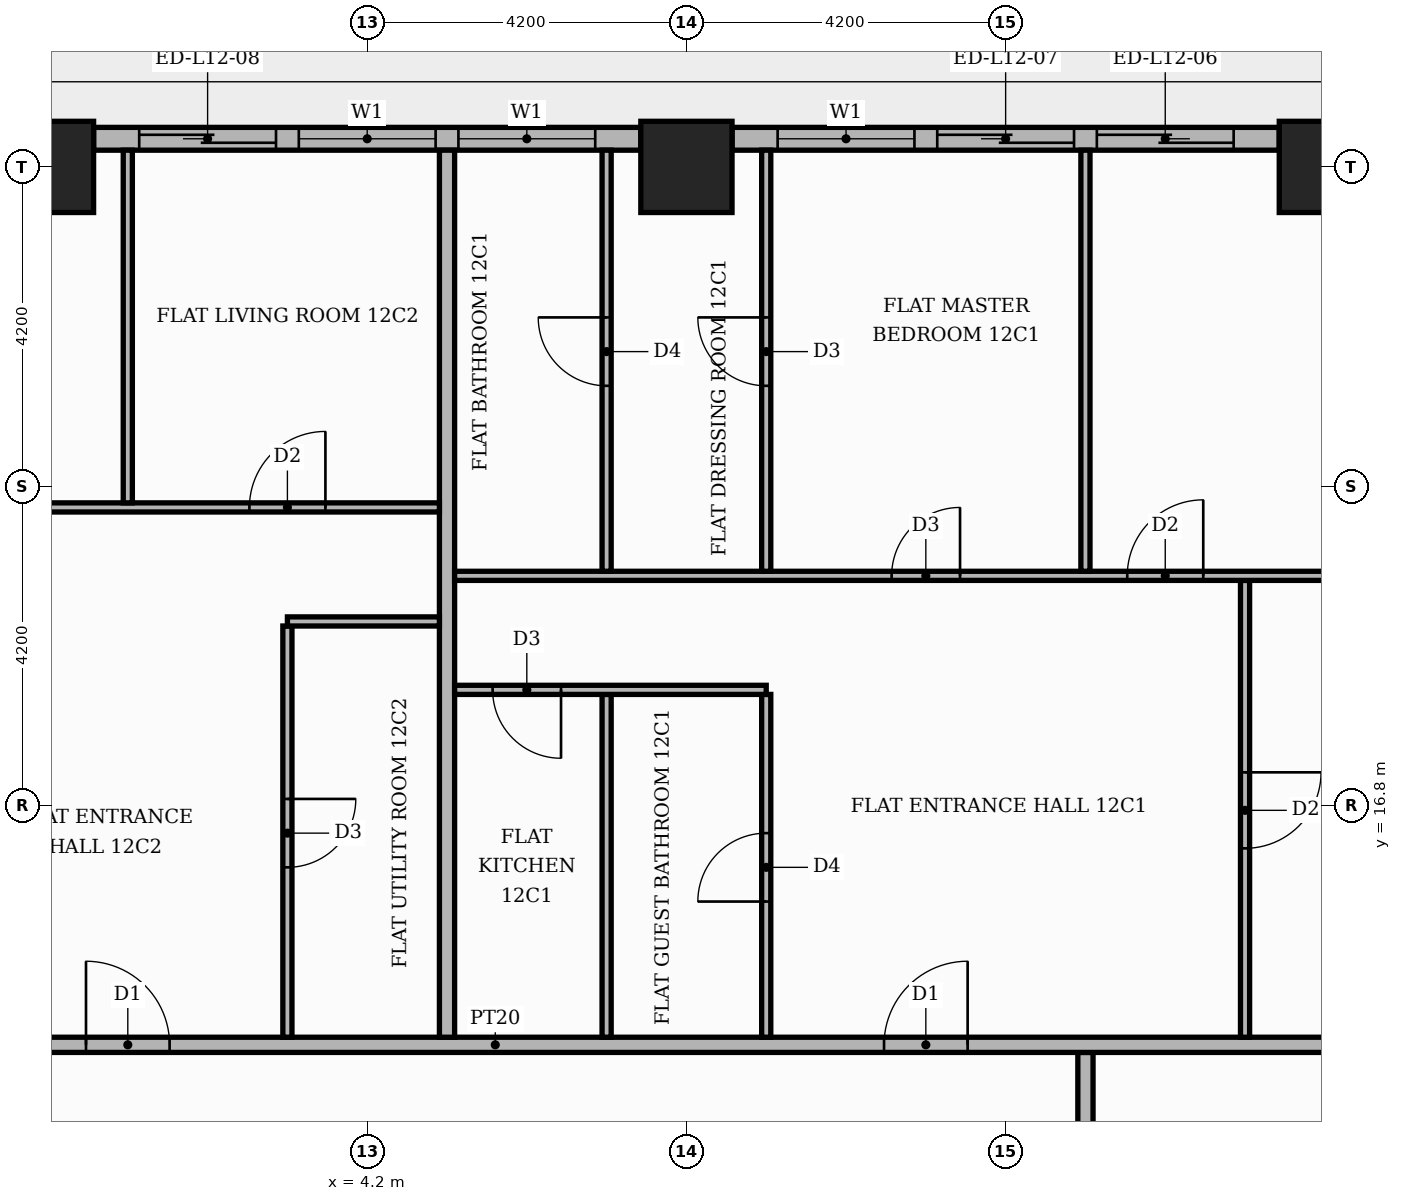
"""IFC4 building model, lengths in metres.
Left out: names, types, materials, properties, quantities, classifications, styles, units other than length and angle.
Written with IfcOpenShell. Run it as: python <this file> out.ifc"""

import sys

from ifc_helpers import new_model, si_unit, direction, frame, frame_2d, origin, origin_2d, place, context, subcontext, project, spatial, rectangle, extrude, element, fill, save


model = new_model("IFC4")
c1 = context("Model", 3, precision=1e-05, world=origin(), true_north=direction((0.0, 1.0)))
c2 = subcontext(c1, "Body", "Model", "MODEL_VIEW")
j1 = project(units=[si_unit("LENGTHUNIT", "METRE"), si_unit("PLANEANGLEUNIT", "RADIAN")], contexts=[c1])
p1 = place(None, origin())
s1 = spatial("IfcSite", under=j1, at=p1, CompositionType="ELEMENT")
p2 = place(p1, origin())
s2 = spatial("IfcBuilding", under=s1, at=p2, CompositionType="ELEMENT")
p3 = place(p2, frame((0.0, 0.0, 54.3)))
s3 = spatial("IfcBuildingStorey", under=s2, at=p3, CompositionType="ELEMENT", Elevation=54.3)
for number, where, z_axis, x_axis in (
    (1, (0.0, 25.2, 0.0), (0.0, 0.0, 1.0), (1.0, 0.0, 0.0)),
    (2, (8.4, 25.2, 0.0), (0.0, 0.0, 1.0), (1.0, 0.0, 0.0)),
    (3, (16.8, 25.2, 0.0), (0.0, 0.0, 1.0), (1.0, 0.0, 0.0)),
):
    element("IfcColumn", number, at=place(p3, frame(where, z_axis=z_axis, x_axis=x_axis)), inside=s3, PredefinedType="COLUMN", context=c2, shape_type="SweptSolid", body=[
        extrude(rectangle(XDim=1.2, YDim=1.2, at=origin_2d()), origin(), (0.0, 0.0, 1.0), 3.9),
    ])
p4 = place(p3, frame((16.2, 25.57, 0.0), z_axis=(0.0, 0.0, 1.0), x_axis=(-1.0, 0.0, 0.0)))
e4 = element("IfcWall", 4, at=p4, inside=s3, PredefinedType="STANDARD", context=c2, shape_type="SweptSolid", body=[
    extrude(rectangle(XDim=7.2, YDim=0.3, at=frame_2d((3.6, 0.0))), origin(), (0.0, 0.0, 1.0), 3.48),
])
p5 = place(p4, frame((0.6, 0.0, 0.0)))
e5 = element("IfcOpeningElement", 5, at=p5, cuts=e4, PredefinedType="OPENING", context=c2, shape_type="SweptSolid", body=[
    extrude(rectangle(XDim=1.8, YDim=2.4, at=frame_2d((0.9, 1.2))), frame((0.0, 0.16, 0.0), z_axis=(0.0, -1.0, 0.0), x_axis=(1.0, 0.0, 0.0)), (0.0, 0.0, 1.0), 0.32),
])
p6 = place(p4, frame((2.7, 0.0, 0.0)))
e6 = element("IfcOpeningElement", 6, at=p6, cuts=e4, PredefinedType="OPENING", context=c2, shape_type="SweptSolid", body=[
    extrude(rectangle(XDim=1.8, YDim=2.4, at=frame_2d((0.9, 1.2))), frame((0.0, 0.16, 0.0), z_axis=(0.0, -1.0, 0.0), x_axis=(1.0, 0.0, 0.0)), (0.0, 0.0, 1.0), 0.32),
])
p7 = place(p4, frame((4.8, 0.0, 0.9)))
e7 = element("IfcOpeningElement", 7, at=p7, cuts=e4, PredefinedType="OPENING", context=c2, shape_type="SweptSolid", body=[
    extrude(rectangle(XDim=1.8, YDim=2.1, at=frame_2d((0.9, 1.05))), frame((0.0, 0.16, 0.0), z_axis=(0.0, -1.0, 0.0), x_axis=(1.0, 0.0, 0.0)), (0.0, 0.0, 1.0), 0.32),
])
p8 = place(p3, frame((7.8, 25.57, 0.0), z_axis=(0.0, 0.0, 1.0), x_axis=(-1.0, 0.0, 0.0)))
e8 = element("IfcWall", 8, at=p8, inside=s3, PredefinedType="STANDARD", context=c2, shape_type="SweptSolid", body=[
    extrude(rectangle(XDim=7.2, YDim=0.3, at=frame_2d((3.6, 0.0))), origin(), (0.0, 0.0, 1.0), 3.48),
])
p9 = place(p8, frame((0.6, 0.0, 0.9)))
e9 = element("IfcOpeningElement", 9, at=p9, cuts=e8, PredefinedType="OPENING", context=c2, shape_type="SweptSolid", body=[
    extrude(rectangle(XDim=1.8, YDim=2.1, at=frame_2d((0.9, 1.05))), frame((0.0, 0.16, 0.0), z_axis=(0.0, -1.0, 0.0), x_axis=(1.0, 0.0, 0.0)), (0.0, 0.0, 1.0), 0.32),
])
p10 = place(p8, frame((2.7, 0.0, 0.9)))
e10 = element("IfcOpeningElement", 10, at=p10, cuts=e8, PredefinedType="OPENING", context=c2, shape_type="SweptSolid", body=[
    extrude(rectangle(XDim=1.8, YDim=2.1, at=frame_2d((0.9, 1.05))), frame((0.0, 0.16, 0.0), z_axis=(0.0, -1.0, 0.0), x_axis=(1.0, 0.0, 0.0)), (0.0, 0.0, 1.0), 0.32),
])
p11 = place(p8, frame((4.8, 0.0, 0.0)))
e11 = element("IfcOpeningElement", 11, at=p11, cuts=e8, PredefinedType="OPENING", context=c2, shape_type="SweptSolid", body=[
    extrude(rectangle(XDim=1.8, YDim=2.4, at=frame_2d((0.9, 1.2))), frame((0.0, 0.16, 0.0), z_axis=(0.0, -1.0, 0.0), x_axis=(1.0, 0.0, 0.0)), (0.0, 0.0, 1.0), 0.32),
])
p12 = place(p3, frame((13.65, -13.55, 0.0), z_axis=(0.0, 0.0, 1.0), x_axis=(0.0, 1.0, 0.0)))
e12 = element("IfcWall", 12, at=p12, inside=s3, PredefinedType="PARTITIONING", context=c2, shape_type="SweptSolid", body=[
    extrude(rectangle(XDim=27.1, YDim=0.2, at=frame_2d((13.55, 0.0))), origin(), (0.0, 0.0, 1.0), 3.48),
])
p13 = place(p12, frame((1.45, 0.0, 0.0)))
e13 = element("IfcOpeningElement", 13, at=p13, cuts=e12, PredefinedType="OPENING", context=c2, shape_type="SweptSolid", body=[
    extrude(rectangle(XDim=1.1, YDim=2.4, at=frame_2d((0.55, 1.2))), frame((0.0, 0.11, 0.0), z_axis=(0.0, -1.0, 0.0), x_axis=(1.0, 0.0, 0.0)), (0.0, 0.0, 1.0), 0.22),
])
p14 = place(p3, frame((-13.65, 13.65, 0.0), z_axis=(0.0, 0.0, 1.0), x_axis=(1.0, 0.0, 0.0)))
e14 = element("IfcWall", 14, at=p14, inside=s3, PredefinedType="PARTITIONING", context=c2, shape_type="SweptSolid", body=[
    extrude(rectangle(XDim=39.07, YDim=0.2, at=frame_2d((19.535, 0.0))), origin(), (0.0, 0.0, 1.0), 3.48),
])
p15 = place(p14, frame((24.65, 0.0, 0.0)))
e15 = element("IfcOpeningElement", 15, at=p15, cuts=e14, PredefinedType="OPENING", context=c2, shape_type="SweptSolid", body=[
    extrude(rectangle(XDim=1.1, YDim=2.4, at=frame_2d((0.55, 1.2))), frame((0.0, 0.11, 0.0), z_axis=(0.0, -1.0, 0.0), x_axis=(1.0, 0.0, 0.0)), (0.0, 0.0, 1.0), 0.22),
])
p16 = place(p14, frame((14.15, 0.0, 0.0)))
e16 = element("IfcOpeningElement", 16, at=p16, cuts=e14, PredefinedType="OPENING", context=c2, shape_type="SweptSolid", body=[
    extrude(rectangle(XDim=1.1, YDim=2.4, at=frame_2d((0.55, 1.2))), frame((0.0, 0.11, 0.0), z_axis=(0.0, -1.0, 0.0), x_axis=(1.0, 0.0, 0.0)), (0.0, 0.0, 1.0), 0.22),
])
p17 = place(p3, frame((3.15, 13.75, 0.0), z_axis=(0.0, 0.0, 1.0), x_axis=(0.0, 1.0, 0.0)))
e17 = element("IfcWall", 17, at=p17, inside=s3, PredefinedType="PARTITIONING", context=c2, shape_type="SweptSolid", body=[
    extrude(rectangle(XDim=5.41, YDim=0.12, at=frame_2d((2.705, 0.0))), origin(), (0.0, 0.0, 1.0), 3.48),
])
p18 = place(p17, frame((2.235, 0.0, 0.0)))
e18 = element("IfcOpeningElement", 18, at=p18, cuts=e17, PredefinedType="OPENING", context=c2, shape_type="SweptSolid", body=[
    extrude(rectangle(XDim=0.9, YDim=2.1, at=frame_2d((0.45, 1.05))), frame((0.0, 0.07, 0.0), z_axis=(0.0, -1.0, 0.0), x_axis=(1.0, 0.0, 0.0)), (0.0, 0.0, 1.0), 0.14),
])
p19 = place(p3, frame((5.25, 13.75, 0.0), z_axis=(0.0, 0.0, 1.0), x_axis=(0.0, 1.0, 0.0)))
e19 = element("IfcWall", 19, at=p19, inside=s3, PredefinedType="PARTITIONING", context=c2, shape_type="SweptSolid", body=[
    extrude(rectangle(XDim=11.67, YDim=0.2, at=frame_2d((5.835, 0.0))), origin(), (0.0, 0.0, 1.0), 3.48),
])
p20 = place(p3, frame((7.35, 13.75, 0.0), z_axis=(0.0, 0.0, 1.0), x_axis=(0.0, 1.0, 0.0)))
e20 = element("IfcWall", 20, at=p20, inside=s3, PredefinedType="PARTITIONING", context=c2, shape_type="SweptSolid", body=[
    extrude(rectangle(XDim=4.51, YDim=0.12, at=frame_2d((2.255, 0.0))), origin(), (0.0, 0.0, 1.0), 3.48),
])
p21 = place(p3, frame((9.45, 13.75, 0.0), z_axis=(0.0, 0.0, 1.0), x_axis=(0.0, 1.0, 0.0)))
e21 = element("IfcWall", 21, at=p21, inside=s3, PredefinedType="PARTITIONING", context=c2, shape_type="SweptSolid", body=[
    extrude(rectangle(XDim=4.51, YDim=0.12, at=frame_2d((2.255, 0.0))), origin(), (0.0, 0.0, 1.0), 3.48),
])
p22 = place(p21, frame((1.785, 0.0, 0.0)))
e22 = element("IfcOpeningElement", 22, at=p22, cuts=e21, PredefinedType="OPENING", context=c2, shape_type="SweptSolid", body=[
    extrude(rectangle(XDim=0.9, YDim=2.1, at=frame_2d((0.45, 1.05))), frame((0.0, 0.07, 0.0), z_axis=(0.0, -1.0, 0.0), x_axis=(1.0, 0.0, 0.0)), (0.0, 0.0, 1.0), 0.14),
])
p23 = place(p3, frame((15.75, 13.75, 0.0), z_axis=(0.0, 0.0, 1.0), x_axis=(0.0, 1.0, 0.0)))
e23 = element("IfcWall", 23, at=p23, inside=s3, PredefinedType="PARTITIONING", context=c2, shape_type="SweptSolid", body=[
    extrude(rectangle(XDim=6.01, YDim=0.12, at=frame_2d((3.005, 0.0))), origin(), (0.0, 0.0, 1.0), 3.48),
])
p24 = place(p23, frame((2.485, 0.0, 0.0)))
e24 = element("IfcOpeningElement", 24, at=p24, cuts=e23, PredefinedType="OPENING", context=c2, shape_type="SweptSolid", body=[
    extrude(rectangle(XDim=1.0, YDim=2.1, at=frame_2d((0.5, 1.05))), frame((0.0, 0.07, 0.0), z_axis=(0.0, -1.0, 0.0), x_axis=(1.0, 0.0, 0.0)), (0.0, 0.0, 1.0), 0.14),
])
p25 = place(p3, frame((5.35, 18.32, 0.0), z_axis=(0.0, 0.0, 1.0), x_axis=(1.0, 0.0, 0.0)))
e25 = element("IfcWall", 25, at=p25, inside=s3, PredefinedType="PARTITIONING", context=c2, shape_type="SweptSolid", body=[
    extrude(rectangle(XDim=4.1, YDim=0.12, at=frame_2d((2.05, 0.0))), origin(), (0.0, 0.0, 1.0), 3.48),
])
p26 = place(p25, frame((0.5, 0.0, 0.0)))
e26 = element("IfcOpeningElement", 26, at=p26, cuts=e25, PredefinedType="OPENING", context=c2, shape_type="SweptSolid", body=[
    extrude(rectangle(XDim=0.9, YDim=2.1, at=frame_2d((0.45, 1.05))), frame((0.0, 0.07, 0.0), z_axis=(0.0, -1.0, 0.0), x_axis=(1.0, 0.0, 0.0)), (0.0, 0.0, 1.0), 0.14),
])
p27 = place(p3, frame((3.15, 19.22, 0.0), z_axis=(0.0, 0.0, 1.0), x_axis=(1.0, 0.0, 0.0)))
e27 = element("IfcWall", 27, at=p27, inside=s3, PredefinedType="PARTITIONING", context=c2, shape_type="SweptSolid", body=[
    extrude(rectangle(XDim=2.0, YDim=0.12, at=frame_2d((1.0, 0.0))), origin(), (0.0, 0.0, 1.0), 3.48),
])
p28 = place(p3, frame((5.35, 19.82, 0.0), z_axis=(0.0, 0.0, 1.0), x_axis=(1.0, 0.0, 0.0)))
e28 = element("IfcWall", 28, at=p28, inside=s3, PredefinedType="PARTITIONING", context=c2, shape_type="SweptSolid", body=[
    extrude(rectangle(XDim=11.95, YDim=0.12, at=frame_2d((5.975, 0.0))), origin(), (0.0, 0.0, 1.0), 3.48),
])
p29 = place(p28, frame((8.85, 0.0, 0.0)))
e29 = element("IfcOpeningElement", 29, at=p29, cuts=e28, PredefinedType="OPENING", context=c2, shape_type="SweptSolid", body=[
    extrude(rectangle(XDim=1.0, YDim=2.1, at=frame_2d((0.5, 1.05))), frame((0.0, 0.07, 0.0), z_axis=(0.0, -1.0, 0.0), x_axis=(1.0, 0.0, 0.0)), (0.0, 0.0, 1.0), 0.14),
])
p30 = place(p28, frame((5.75, 0.0, 0.0)))
e30 = element("IfcOpeningElement", 30, at=p30, cuts=e28, PredefinedType="OPENING", context=c2, shape_type="SweptSolid", body=[
    extrude(rectangle(XDim=0.9, YDim=2.1, at=frame_2d((0.45, 1.05))), frame((0.0, 0.07, 0.0), z_axis=(0.0, -1.0, 0.0), x_axis=(1.0, 0.0, 0.0)), (0.0, 0.0, 1.0), 0.14),
])
p31 = place(p3, frame((7.35, 19.88, 0.0), z_axis=(0.0, 0.0, 1.0), x_axis=(0.0, 1.0, 0.0)))
e31 = element("IfcWall", 31, at=p31, inside=s3, PredefinedType="PARTITIONING", context=c2, shape_type="SweptSolid", body=[
    extrude(rectangle(XDim=5.54, YDim=0.12, at=frame_2d((2.77, 0.0))), origin(), (0.0, 0.0, 1.0), 3.48),
])
p32 = place(p31, frame((2.44, 0.0, 0.0)))
e32 = element("IfcOpeningElement", 32, at=p32, cuts=e31, PredefinedType="OPENING", context=c2, shape_type="SweptSolid", body=[
    extrude(rectangle(XDim=0.9, YDim=2.1, at=frame_2d((0.45, 1.05))), frame((0.0, 0.07, 0.0), z_axis=(0.0, -1.0, 0.0), x_axis=(1.0, 0.0, 0.0)), (0.0, 0.0, 1.0), 0.14),
])
p33 = place(p3, frame((9.45, 19.88, 0.0), z_axis=(0.0, 0.0, 1.0), x_axis=(0.0, 1.0, 0.0)))
e33 = element("IfcWall", 33, at=p33, inside=s3, PredefinedType="PARTITIONING", context=c2, shape_type="SweptSolid", body=[
    extrude(rectangle(XDim=5.54, YDim=0.12, at=frame_2d((2.77, 0.0))), origin(), (0.0, 0.0, 1.0), 3.48),
])
p34 = place(p33, frame((2.44, 0.0, 0.0)))
e34 = element("IfcOpeningElement", 34, at=p34, cuts=e33, PredefinedType="OPENING", context=c2, shape_type="SweptSolid", body=[
    extrude(rectangle(XDim=0.9, YDim=2.1, at=frame_2d((0.45, 1.05))), frame((0.0, 0.07, 0.0), z_axis=(0.0, -1.0, 0.0), x_axis=(1.0, 0.0, 0.0)), (0.0, 0.0, 1.0), 0.14),
])
p35 = place(p3, frame((13.65, 19.88, 0.0), z_axis=(0.0, 0.0, 1.0), x_axis=(0.0, 1.0, 0.0)))
e35 = element("IfcWall", 35, at=p35, inside=s3, PredefinedType="PARTITIONING", context=c2, shape_type="SweptSolid", body=[
    extrude(rectangle(XDim=5.54, YDim=0.12, at=frame_2d((2.77, 0.0))), origin(), (0.0, 0.0, 1.0), 3.48),
])
p36 = place(p3, frame((-13.55, 20.72, 0.0), z_axis=(0.0, 0.0, 1.0), x_axis=(1.0, 0.0, 0.0)))
e36 = element("IfcWall", 36, at=p36, inside=s3, PredefinedType="PARTITIONING", context=c2, shape_type="SweptSolid", body=[
    extrude(rectangle(XDim=18.7, YDim=0.12, at=frame_2d((9.35, 0.0))), origin(), (0.0, 0.0, 1.0), 3.48),
])
p37 = place(p36, frame((16.2, 0.0, 0.0)))
e37 = element("IfcOpeningElement", 37, at=p37, cuts=e36, PredefinedType="OPENING", context=c2, shape_type="SweptSolid", body=[
    extrude(rectangle(XDim=1.0, YDim=2.1, at=frame_2d((0.5, 1.05))), frame((0.0, 0.07, 0.0), z_axis=(0.0, -1.0, 0.0), x_axis=(1.0, 0.0, 0.0)), (0.0, 0.0, 1.0), 0.14),
])
p38 = place(p36, frame((12.05, 0.0, 0.0)))
e38 = element("IfcOpeningElement", 38, at=p38, cuts=e36, PredefinedType="OPENING", context=c2, shape_type="SweptSolid", body=[
    extrude(rectangle(XDim=0.9, YDim=2.1, at=frame_2d((0.45, 1.05))), frame((0.0, 0.07, 0.0), z_axis=(0.0, -1.0, 0.0), x_axis=(1.0, 0.0, 0.0)), (0.0, 0.0, 1.0), 0.14),
])
p39 = place(p36, frame((3.65, 0.0, 0.0)))
e39 = element("IfcOpeningElement", 39, at=p39, cuts=e36, PredefinedType="OPENING", context=c2, shape_type="SweptSolid", body=[
    extrude(rectangle(XDim=0.9, YDim=2.1, at=frame_2d((0.45, 1.05))), frame((0.0, 0.07, 0.0), z_axis=(0.0, -1.0, 0.0), x_axis=(1.0, 0.0, 0.0)), (0.0, 0.0, 1.0), 0.14),
])
p40 = place(p3, frame((1.05, 20.78, 0.0), z_axis=(0.0, 0.0, 1.0), x_axis=(0.0, 1.0, 0.0)))
e40 = element("IfcWall", 40, at=p40, inside=s3, PredefinedType="PARTITIONING", context=c2, shape_type="SweptSolid", body=[
    extrude(rectangle(XDim=4.64, YDim=0.12, at=frame_2d((2.32, 0.0))), origin(), (0.0, 0.0, 1.0), 3.48),
])
p41 = place(p5, origin())
e41 = element("IfcDoor", 41, at=p41, inside=s3, OperationType="SLIDING_TO_LEFT", PredefinedType="DOOR", context=c2, shape_type="SweptSolid", body=[
    extrude(rectangle(XDim=1.8, YDim=2.4, at=frame_2d((0.9, 1.2))), frame((0.0, 0.025, 0.0), z_axis=(0.0, -1.0, 0.0), x_axis=(1.0, 0.0, 0.0)), (0.0, 0.0, 1.0), 0.05),
])
fill(e5, e41)
p42 = place(p6, origin())
e42 = element("IfcDoor", 42, at=p42, inside=s3, OperationType="SLIDING_TO_RIGHT", PredefinedType="DOOR", context=c2, shape_type="SweptSolid", body=[
    extrude(rectangle(XDim=1.8, YDim=2.4, at=frame_2d((0.9, 1.2))), frame((0.0, 0.025, 0.0), z_axis=(0.0, -1.0, 0.0), x_axis=(1.0, 0.0, 0.0)), (0.0, 0.0, 1.0), 0.05),
])
fill(e6, e42)
p43 = place(p7, origin())
e43 = element("IfcWindow", 43, at=p43, inside=s3, PartitioningType="SINGLE_PANEL", PredefinedType="WINDOW", context=c2, shape_type="SweptSolid", body=[
    extrude(rectangle(XDim=1.8, YDim=2.1, at=frame_2d((0.9, 1.05))), frame((0.0, 0.03, 0.0), z_axis=(0.0, -1.0, 0.0), x_axis=(1.0, 0.0, 0.0)), (0.0, 0.0, 1.0), 0.06),
])
fill(e7, e43)
p44 = place(p9, origin())
e44 = element("IfcWindow", 44, at=p44, inside=s3, PartitioningType="SINGLE_PANEL", PredefinedType="WINDOW", context=c2, shape_type="SweptSolid", body=[
    extrude(rectangle(XDim=1.8, YDim=2.1, at=frame_2d((0.9, 1.05))), frame((0.0, 0.03, 0.0), z_axis=(0.0, -1.0, 0.0), x_axis=(1.0, 0.0, 0.0)), (0.0, 0.0, 1.0), 0.06),
])
fill(e9, e44)
p45 = place(p10, origin())
e45 = element("IfcWindow", 45, at=p45, inside=s3, PartitioningType="SINGLE_PANEL", PredefinedType="WINDOW", context=c2, shape_type="SweptSolid", body=[
    extrude(rectangle(XDim=1.8, YDim=2.1, at=frame_2d((0.9, 1.05))), frame((0.0, 0.03, 0.0), z_axis=(0.0, -1.0, 0.0), x_axis=(1.0, 0.0, 0.0)), (0.0, 0.0, 1.0), 0.06),
])
fill(e10, e45)
p46 = place(p11, origin())
e46 = element("IfcDoor", 46, at=p46, inside=s3, OperationType="SLIDING_TO_RIGHT", PredefinedType="DOOR", context=c2, shape_type="SweptSolid", body=[
    extrude(rectangle(XDim=1.8, YDim=2.4, at=frame_2d((0.9, 1.2))), frame((0.0, 0.025, 0.0), z_axis=(0.0, -1.0, 0.0), x_axis=(1.0, 0.0, 0.0)), (0.0, 0.0, 1.0), 0.05),
])
fill(e11, e46)
p47 = place(p15, origin())
e47 = element("IfcDoor", 47, at=p47, inside=s3, OperationType="SINGLE_SWING_RIGHT", PredefinedType="DOOR", context=c2, shape_type="SweptSolid", body=[
    extrude(rectangle(XDim=1.1, YDim=2.4, at=frame_2d((0.55, 1.2))), frame((0.0, 0.025, 0.0), z_axis=(0.0, -1.0, 0.0), x_axis=(1.0, 0.0, 0.0)), (0.0, 0.0, 1.0), 0.05),
])
fill(e15, e47)
p48 = place(p24, frame((1.0, 0.0, 0.0), z_axis=(0.0, 0.0, 1.0), x_axis=(-1.0, 0.0, 0.0)))
e48 = element("IfcDoor", 48, at=p48, inside=s3, OperationType="SINGLE_SWING_RIGHT", PredefinedType="DOOR", context=c2, shape_type="SweptSolid", body=[
    extrude(rectangle(XDim=1.0, YDim=2.1, at=frame_2d((0.5, 1.05))), frame((0.0, 0.025, 0.0), z_axis=(0.0, -1.0, 0.0), x_axis=(1.0, 0.0, 0.0)), (0.0, 0.0, 1.0), 0.05),
])
fill(e24, e48)
p49 = place(p22, origin())
e49 = element("IfcDoor", 49, at=p49, inside=s3, OperationType="SINGLE_SWING_LEFT", PredefinedType="DOOR", context=c2, shape_type="SweptSolid", body=[
    extrude(rectangle(XDim=0.9, YDim=2.1, at=frame_2d((0.45, 1.05))), frame((0.0, 0.025, 0.0), z_axis=(0.0, -1.0, 0.0), x_axis=(1.0, 0.0, 0.0)), (0.0, 0.0, 1.0), 0.05),
])
fill(e22, e49)
p50 = place(p26, frame((0.9, 0.0, 0.0), z_axis=(0.0, 0.0, 1.0), x_axis=(-1.0, 0.0, 0.0)))
e50 = element("IfcDoor", 50, at=p50, inside=s3, OperationType="SINGLE_SWING_RIGHT", PredefinedType="DOOR", context=c2, shape_type="SweptSolid", body=[
    extrude(rectangle(XDim=0.9, YDim=2.1, at=frame_2d((0.45, 1.05))), frame((0.0, 0.025, 0.0), z_axis=(0.0, -1.0, 0.0), x_axis=(1.0, 0.0, 0.0)), (0.0, 0.0, 1.0), 0.05),
])
fill(e26, e50)
p51 = place(p29, origin())
e51 = element("IfcDoor", 51, at=p51, inside=s3, OperationType="SINGLE_SWING_RIGHT", PredefinedType="DOOR", context=c2, shape_type="SweptSolid", body=[
    extrude(rectangle(XDim=1.0, YDim=2.1, at=frame_2d((0.5, 1.05))), frame((0.0, 0.025, 0.0), z_axis=(0.0, -1.0, 0.0), x_axis=(1.0, 0.0, 0.0)), (0.0, 0.0, 1.0), 0.05),
])
fill(e29, e51)
p52 = place(p30, origin())
e52 = element("IfcDoor", 52, at=p52, inside=s3, OperationType="SINGLE_SWING_RIGHT", PredefinedType="DOOR", context=c2, shape_type="SweptSolid", body=[
    extrude(rectangle(XDim=0.9, YDim=2.1, at=frame_2d((0.45, 1.05))), frame((0.0, 0.025, 0.0), z_axis=(0.0, -1.0, 0.0), x_axis=(1.0, 0.0, 0.0)), (0.0, 0.0, 1.0), 0.05),
])
fill(e30, e52)
p53 = place(p34, origin())
e53 = element("IfcDoor", 53, at=p53, inside=s3, OperationType="SINGLE_SWING_RIGHT", PredefinedType="DOOR", context=c2, shape_type="SweptSolid", body=[
    extrude(rectangle(XDim=0.9, YDim=2.1, at=frame_2d((0.45, 1.05))), frame((0.0, 0.025, 0.0), z_axis=(0.0, -1.0, 0.0), x_axis=(1.0, 0.0, 0.0)), (0.0, 0.0, 1.0), 0.05),
])
fill(e34, e53)
p54 = place(p32, origin())
e54 = element("IfcDoor", 54, at=p54, inside=s3, OperationType="SINGLE_SWING_RIGHT", PredefinedType="DOOR", context=c2, shape_type="SweptSolid", body=[
    extrude(rectangle(XDim=0.9, YDim=2.1, at=frame_2d((0.45, 1.05))), frame((0.0, 0.025, 0.0), z_axis=(0.0, -1.0, 0.0), x_axis=(1.0, 0.0, 0.0)), (0.0, 0.0, 1.0), 0.05),
])
fill(e32, e54)
p55 = place(p16, origin())
e55 = element("IfcDoor", 55, at=p55, inside=s3, OperationType="SINGLE_SWING_LEFT", PredefinedType="DOOR", context=c2, shape_type="SweptSolid", body=[
    extrude(rectangle(XDim=1.1, YDim=2.4, at=frame_2d((0.55, 1.2))), frame((0.0, 0.025, 0.0), z_axis=(0.0, -1.0, 0.0), x_axis=(1.0, 0.0, 0.0)), (0.0, 0.0, 1.0), 0.05),
])
fill(e16, e55)
p56 = place(p18, frame((0.9, 0.0, 0.0), z_axis=(0.0, 0.0, 1.0), x_axis=(-1.0, 0.0, 0.0)))
e56 = element("IfcDoor", 56, at=p56, inside=s3, OperationType="SINGLE_SWING_RIGHT", PredefinedType="DOOR", context=c2, shape_type="SweptSolid", body=[
    extrude(rectangle(XDim=0.9, YDim=2.1, at=frame_2d((0.45, 1.05))), frame((0.0, 0.025, 0.0), z_axis=(0.0, -1.0, 0.0), x_axis=(1.0, 0.0, 0.0)), (0.0, 0.0, 1.0), 0.05),
])
fill(e18, e56)
p57 = place(p37, origin())
e57 = element("IfcDoor", 57, at=p57, inside=s3, OperationType="SINGLE_SWING_RIGHT", PredefinedType="DOOR", context=c2, shape_type="SweptSolid", body=[
    extrude(rectangle(XDim=1.0, YDim=2.1, at=frame_2d((0.5, 1.05))), frame((0.0, 0.025, 0.0), z_axis=(0.0, -1.0, 0.0), x_axis=(1.0, 0.0, 0.0)), (0.0, 0.0, 1.0), 0.05),
])
fill(e37, e57)
save(model, sys.argv[1])
